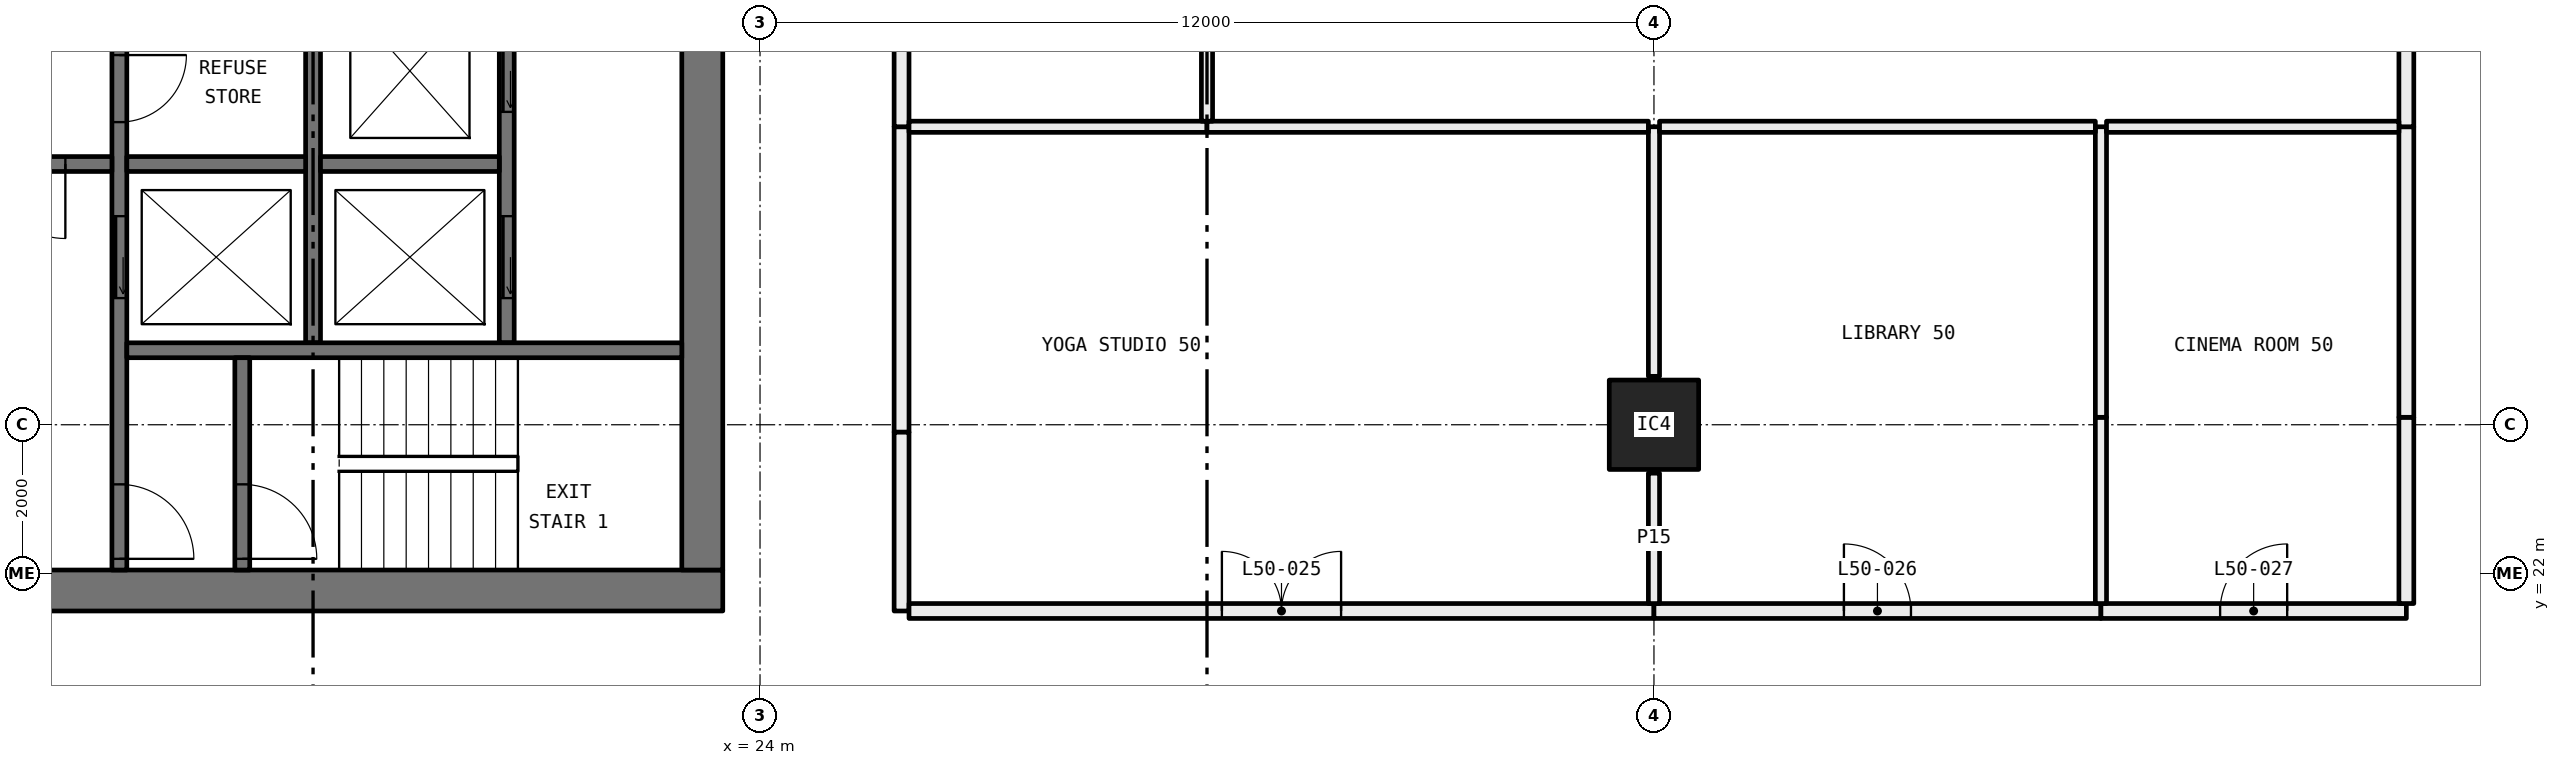
"""IFC4 building model, lengths in metres.
Left out: names, types, materials, properties, quantities, classifications, styles, units other than length and angle.
Written with IfcOpenShell. Run it as: python <this file> out.ifc"""

import sys

from ifc_helpers import new_model, si_unit, direction, frame, frame_2d, origin, origin_2d, place, context, subcontext, project, spatial, rectangle, hollow_rectangle, extrude, element, fill, save


model = new_model("IFC4")
c1 = context("Model", 3, precision=1e-05, world=origin(), true_north=direction((0.0, 1.0)))
c2 = subcontext(c1, "Body", "Model", "MODEL_VIEW")
j1 = project(units=[si_unit("LENGTHUNIT", "METRE"), si_unit("PLANEANGLEUNIT", "RADIAN")], contexts=[c1])
p1 = place(None, origin())
s1 = spatial("IfcSite", under=j1, at=p1, CompositionType="ELEMENT")
p2 = place(p1, origin())
s2 = spatial("IfcBuilding", under=s1, at=p2, CompositionType="ELEMENT")
p3 = place(p2, frame((0.0, 0.0, 189.3)))
s3 = spatial("IfcBuildingStorey", under=s2, at=p3, CompositionType="ELEMENT", Elevation=189.3)
p4 = place(p3, frame((36.0, 24.0, 0.0), z_axis=(0.0, 0.0, 1.0), x_axis=(1.0, 0.0, 0.0)))
e1 = element("IfcColumn", 1, at=p4, inside=s3, PredefinedType="COLUMN", context=c2, shape_type="SweptSolid", body=[
    extrude(hollow_rectangle(XDim=1.2, YDim=1.2, WallThickness=0.05, at=origin_2d()), origin(), (0.0, 0.0, 1.0), 3.05),
])
p5 = place(p3, frame((25.9, 28.0, 0.0), z_axis=(0.0, 0.0, 1.0), x_axis=(0.0, -1.0, 0.0)))
e2 = element("IfcWall", 2, at=p5, inside=s3, PredefinedType="PARTITIONING", context=c2, shape_type="SweptSolid", body=[
    extrude(rectangle(XDim=4.1, YDim=0.2, at=frame_2d((2.05, 0.0))), origin(), (0.0, 0.0, 1.0), 2.45),
])
p6 = place(p3, frame((25.9, 23.9, 0.0), z_axis=(0.0, 0.0, 1.0), x_axis=(0.0, -1.0, 0.0)))
e3 = element("IfcWall", 3, at=p6, inside=s3, PredefinedType="PARTITIONING", context=c2, shape_type="SweptSolid", body=[
    extrude(rectangle(XDim=2.4, YDim=0.2, at=frame_2d((1.2, 0.0))), origin(), (0.0, 0.0, 1.0), 3.05),
])
p7 = place(p3, frame((26.0, 21.5, 0.0), z_axis=(0.0, 0.0, 1.0), x_axis=(1.0, 0.0, 0.0)))
e4 = element("IfcWall", 4, at=p7, inside=s3, PredefinedType="PARTITIONING", context=c2, shape_type="SweptSolid", body=[
    extrude(rectangle(XDim=10.0, YDim=0.2, at=frame_2d((5.0, 0.0))), origin(), (0.0, 0.0, 1.0), 2.45),
])
p8 = place(p7, frame((4.2, 0.0, 0.0)))
e5 = element("IfcOpeningElement", 5, at=p8, cuts=e4, PredefinedType="OPENING", context=c2, shape_type="SweptSolid", body=[
    extrude(rectangle(XDim=1.6, YDim=2.1, at=frame_2d((0.8, 1.05))), frame((0.0, 0.11, 0.0), z_axis=(0.0, -1.0, 0.0), x_axis=(1.0, 0.0, 0.0)), (0.0, 0.0, 1.0), 0.22),
])
p9 = place(p3, frame((36.0, 21.5, 0.0), z_axis=(0.0, 0.0, 1.0), x_axis=(1.0, 0.0, 0.0)))
e6 = element("IfcWall", 6, at=p9, inside=s3, PredefinedType="PARTITIONING", context=c2, shape_type="SweptSolid", body=[
    extrude(rectangle(XDim=6.0, YDim=0.2, at=frame_2d((3.0, 0.0))), origin(), (0.0, 0.0, 1.0), 2.45),
])
p10 = place(p9, frame((2.55, 0.0, 0.0)))
e7 = element("IfcOpeningElement", 7, at=p10, cuts=e6, PredefinedType="OPENING", context=c2, shape_type="SweptSolid", body=[
    extrude(rectangle(XDim=0.9, YDim=2.1, at=frame_2d((0.45, 1.05))), frame((0.0, 0.11, 0.0), z_axis=(0.0, -1.0, 0.0), x_axis=(1.0, 0.0, 0.0)), (0.0, 0.0, 1.0), 0.22),
])
p11 = place(p3, frame((42.0, 21.5, 0.0), z_axis=(0.0, 0.0, 1.0), x_axis=(1.0, 0.0, 0.0)))
e8 = element("IfcWall", 8, at=p11, inside=s3, PredefinedType="PARTITIONING", context=c2, shape_type="SweptSolid", body=[
    extrude(rectangle(XDim=4.1, YDim=0.2, at=frame_2d((2.05, 0.0))), origin(), (0.0, 0.0, 1.0), 3.05),
])
p12 = place(p11, frame((1.6, 0.0, 0.0)))
e9 = element("IfcOpeningElement", 9, at=p12, cuts=e8, PredefinedType="OPENING", context=c2, shape_type="SweptSolid", body=[
    extrude(rectangle(XDim=0.9, YDim=2.1, at=frame_2d((0.45, 1.05))), frame((0.0, 0.11, 0.0), z_axis=(0.0, -1.0, 0.0), x_axis=(1.0, 0.0, 0.0)), (0.0, 0.0, 1.0), 0.22),
])
p13 = place(p3, frame((46.1, 21.6, 0.0), z_axis=(0.0, 0.0, 1.0), x_axis=(0.0, 1.0, 0.0)))
e10 = element("IfcWall", 10, at=p13, inside=s3, PredefinedType="PARTITIONING", context=c2, shape_type="SweptSolid", body=[
    extrude(rectangle(XDim=2.5, YDim=0.2, at=frame_2d((1.25, 0.0))), origin(), (0.0, 0.0, 1.0), 2.45),
])
p14 = place(p3, frame((46.1, 24.1, 0.0), z_axis=(0.0, 0.0, 1.0), x_axis=(0.0, 1.0, 0.0)))
e11 = element("IfcWall", 11, at=p14, inside=s3, PredefinedType="PARTITIONING", context=c2, shape_type="SweptSolid", body=[
    extrude(rectangle(XDim=3.9, YDim=0.2, at=frame_2d((1.95, 0.0))), origin(), (0.0, 0.0, 1.0), 3.05),
])
p15 = place(p3, frame((25.9, 35.9, 0.0), z_axis=(0.0, 0.0, 1.0), x_axis=(0.0, -1.0, 0.0)))
e12 = element("IfcWall", 12, at=p15, inside=s3, PredefinedType="PARTITIONING", context=c2, shape_type="SweptSolid", body=[
    extrude(rectangle(XDim=7.9, YDim=0.2, at=frame_2d((3.95, 0.0))), origin(), (0.0, 0.0, 1.0), 3.05),
])
p16 = place(p15, frame((3.5, 0.0, 0.0)))
e13 = element("IfcOpeningElement", 13, at=p16, cuts=e12, PredefinedType="OPENING", context=c2, shape_type="SweptSolid", body=[
    extrude(rectangle(XDim=0.9, YDim=2.1, at=frame_2d((0.45, 1.05))), frame((0.0, 0.11, 0.0), z_axis=(0.0, -1.0, 0.0), x_axis=(1.0, 0.0, 0.0)), (0.0, 0.0, 1.0), 0.22),
])
p17 = place(p3, frame((46.1, 28.0, 0.0), z_axis=(0.0, 0.0, 1.0), x_axis=(0.0, 1.0, 0.0)))
e14 = element("IfcWall", 14, at=p17, inside=s3, PredefinedType="PARTITIONING", context=c2, shape_type="SweptSolid", body=[
    extrude(rectangle(XDim=8.1, YDim=0.2, at=frame_2d((4.05, 0.0))), origin(), (0.0, 0.0, 1.0), 2.45),
])
p18 = place(p3, frame((36.0, 21.6, 0.0), z_axis=(0.0, 0.0, 1.0), x_axis=(0.0, 1.0, 0.0)))
e15 = element("IfcWall", 15, at=p18, inside=s3, PredefinedType="PARTITIONING", context=c2, shape_type="SweptSolid", body=[
    extrude(rectangle(XDim=1.75, YDim=0.15, at=frame_2d((0.875, 0.0))), origin(), (0.0, 0.0, 1.0), 2.45),
])
p19 = place(p3, frame((36.0, 24.65, 0.0), z_axis=(0.0, 0.0, 1.0), x_axis=(0.0, 1.0, 0.0)))
e16 = element("IfcWall", 16, at=p19, inside=s3, PredefinedType="PARTITIONING", context=c2, shape_type="SweptSolid", body=[
    extrude(rectangle(XDim=3.35, YDim=0.15, at=frame_2d((1.675, 0.0))), origin(), (0.0, 0.0, 1.0), 2.45),
])
p20 = place(p3, frame((30.0, 28.0, 0.0), z_axis=(0.0, 0.0, 1.0), x_axis=(-1.0, 0.0, 0.0)))
e17 = element("IfcWall", 17, at=p20, inside=s3, PredefinedType="PARTITIONING", context=c2, shape_type="SweptSolid", body=[
    extrude(rectangle(XDim=4.0, YDim=0.15, at=frame_2d((2.0, 0.0))), origin(), (0.0, 0.0, 1.0), 3.05),
])
p21 = place(p3, frame((35.925, 28.0, 0.0), z_axis=(0.0, 0.0, 1.0), x_axis=(-1.0, 0.0, 0.0)))
e18 = element("IfcWall", 18, at=p21, inside=s3, PredefinedType="PARTITIONING", context=c2, shape_type="SweptSolid", body=[
    extrude(rectangle(XDim=5.925, YDim=0.15, at=frame_2d((2.962, 0.0))), origin(), (0.0, 0.0, 1.0), 2.45),
])
p22 = place(p3, frame((42.0, 21.6, 0.0), z_axis=(0.0, 0.0, 1.0), x_axis=(0.0, 1.0, 0.0)))
e19 = element("IfcWall", 19, at=p22, inside=s3, PredefinedType="PARTITIONING", context=c2, shape_type="SweptSolid", body=[
    extrude(rectangle(XDim=2.5, YDim=0.15, at=frame_2d((1.25, 0.0))), origin(), (0.0, 0.0, 1.0), 2.45),
])
p23 = place(p3, frame((42.0, 24.1, 0.0), z_axis=(0.0, 0.0, 1.0), x_axis=(0.0, 1.0, 0.0)))
e20 = element("IfcWall", 20, at=p23, inside=s3, PredefinedType="PARTITIONING", context=c2, shape_type="SweptSolid", body=[
    extrude(rectangle(XDim=3.9, YDim=0.15, at=frame_2d((1.95, 0.0))), origin(), (0.0, 0.0, 1.0), 3.05),
])
p24 = place(p3, frame((41.925, 28.0, 0.0), z_axis=(0.0, 0.0, 1.0), x_axis=(-1.0, 0.0, 0.0)))
e21 = element("IfcWall", 21, at=p24, inside=s3, PredefinedType="PARTITIONING", context=c2, shape_type="SweptSolid", body=[
    extrude(rectangle(XDim=5.85, YDim=0.15, at=frame_2d((2.925, 0.0))), origin(), (0.0, 0.0, 1.0), 2.45),
])
p25 = place(p3, frame((46.0, 28.0, 0.0), z_axis=(0.0, 0.0, 1.0), x_axis=(-1.0, 0.0, 0.0)))
e22 = element("IfcWall", 22, at=p25, inside=s3, PredefinedType="PARTITIONING", context=c2, shape_type="SweptSolid", body=[
    extrude(rectangle(XDim=3.925, YDim=0.15, at=frame_2d((1.962, 0.0))), origin(), (0.0, 0.0, 1.0), 3.05),
])
p26 = place(p3, frame((30.0, 28.075, 0.0), z_axis=(0.0, 0.0, 1.0), x_axis=(0.0, 1.0, 0.0)))
e23 = element("IfcWall", 23, at=p26, inside=s3, PredefinedType="PARTITIONING", context=c2, shape_type="SweptSolid", body=[
    extrude(rectangle(XDim=8.025, YDim=0.15, at=frame_2d((4.013, 0.0))), origin(), (0.0, 0.0, 1.0), 2.45),
])
p27 = place(p3, frame((12.5, 21.775, 0.0), z_axis=(0.0, 0.0, 1.0), x_axis=(1.0, 0.0, 0.0)))
e24 = element("IfcWall", 24, at=p27, inside=s3, PredefinedType="SHEAR", context=c2, shape_type="SweptSolid", body=[
    extrude(rectangle(XDim=11.0, YDim=0.55, at=frame_2d((5.5, 0.0))), origin(), (0.0, 0.0, 1.0), 3.05),
])
p28 = place(p3, frame((23.225, 22.05, 0.0), z_axis=(0.0, 0.0, 1.0), x_axis=(0.0, 1.0, 0.0)))
e25 = element("IfcWall", 25, at=p28, inside=s3, PredefinedType="SHEAR", context=c2, shape_type="SweptSolid", body=[
    extrude(rectangle(XDim=15.9, YDim=0.55, at=frame_2d((7.95, 0.0))), origin(), (0.0, 0.0, 1.0), 3.05),
])
p29 = place(p28, frame((7.15, 0.0, 0.0)))
e26 = element("IfcOpeningElement", 26, at=p29, cuts=e25, PredefinedType="OPENING", context=c2, shape_type="SweptSolid", body=[
    extrude(rectangle(XDim=1.6, YDim=2.1, at=frame_2d((0.8, 1.05))), frame((0.0, 0.285, 0.0), z_axis=(0.0, -1.0, 0.0), x_axis=(1.0, 0.0, 0.0)), (0.0, 0.0, 1.0), 0.57),
])
p30 = place(p3, frame((15.4, 22.05, 0.0), z_axis=(0.0, 0.0, 1.0), x_axis=(0.0, 1.0, 0.0)))
e27 = element("IfcWall", 27, at=p30, inside=s3, PredefinedType="SOLIDWALL", context=c2, shape_type="SweptSolid", body=[
    extrude(rectangle(XDim=12.85, YDim=0.2, at=frame_2d((6.425, 0.0))), origin(), (0.0, 0.0, 1.0), 3.05),
])
p31 = place(p30, frame((3.65, 0.0, 0.0)))
e28 = element("IfcOpeningElement", 28, at=p31, cuts=e27, PredefinedType="OPENING", context=c2, shape_type="SweptSolid", body=[
    extrude(rectangle(XDim=1.1, YDim=2.1, at=frame_2d((0.55, 1.05))), frame((0.0, 0.11, 0.0), z_axis=(0.0, -1.0, 0.0), x_axis=(1.0, 0.0, 0.0)), (0.0, 0.0, 1.0), 0.22),
])
p32 = place(p30, frame((0.15, 0.0, 0.0)))
e29 = element("IfcOpeningElement", 29, at=p32, cuts=e27, PredefinedType="OPENING", context=c2, shape_type="SweptSolid", body=[
    extrude(rectangle(XDim=1.0, YDim=2.1, at=frame_2d((0.5, 1.05))), frame((0.0, 0.11, 0.0), z_axis=(0.0, -1.0, 0.0), x_axis=(1.0, 0.0, 0.0)), (0.0, 0.0, 1.0), 0.22),
])
p33 = place(p30, frame((6.012, 0.0, 0.0)))
e30 = element("IfcOpeningElement", 30, at=p33, cuts=e27, PredefinedType="OPENING", context=c2, shape_type="SweptSolid", body=[
    extrude(rectangle(XDim=0.9, YDim=2.1, at=frame_2d((0.45, 1.05))), frame((0.0, 0.11, 0.0), z_axis=(0.0, -1.0, 0.0), x_axis=(1.0, 0.0, 0.0)), (0.0, 0.0, 1.0), 0.22),
])
p34 = place(p30, frame((9.663, 0.0, 0.0)))
e31 = element("IfcOpeningElement", 31, at=p34, cuts=e27, PredefinedType="OPENING", context=c2, shape_type="SweptSolid", body=[
    extrude(rectangle(XDim=0.9, YDim=2.1, at=frame_2d((0.45, 1.05))), frame((0.0, 0.11, 0.0), z_axis=(0.0, -1.0, 0.0), x_axis=(1.0, 0.0, 0.0)), (0.0, 0.0, 1.0), 0.22),
])
p35 = place(p3, frame((20.6, 25.1, 0.0), z_axis=(0.0, 0.0, 1.0), x_axis=(0.0, 1.0, 0.0)))
e32 = element("IfcWall", 32, at=p35, inside=s3, PredefinedType="SOLIDWALL", context=c2, shape_type="SweptSolid", body=[
    extrude(rectangle(XDim=12.85, YDim=0.2, at=frame_2d((6.425, 0.0))), origin(), (0.0, 0.0, 1.0), 3.05),
])
p36 = place(p35, frame((0.6, 0.0, 0.0)))
e33 = element("IfcOpeningElement", 33, at=p36, cuts=e32, PredefinedType="OPENING", context=c2, shape_type="SweptSolid", body=[
    extrude(rectangle(XDim=1.1, YDim=2.1, at=frame_2d((0.55, 1.05))), frame((0.0, 0.11, 0.0), z_axis=(0.0, -1.0, 0.0), x_axis=(1.0, 0.0, 0.0)), (0.0, 0.0, 1.0), 0.22),
])
p37 = place(p35, frame((3.1, 0.0, 0.0)))
e34 = element("IfcOpeningElement", 34, at=p37, cuts=e32, PredefinedType="OPENING", context=c2, shape_type="SweptSolid", body=[
    extrude(rectangle(XDim=1.1, YDim=2.1, at=frame_2d((0.55, 1.05))), frame((0.0, 0.11, 0.0), z_axis=(0.0, -1.0, 0.0), x_axis=(1.0, 0.0, 0.0)), (0.0, 0.0, 1.0), 0.22),
])
p38 = place(p35, frame((5.6, 0.0, 0.0)))
e35 = element("IfcOpeningElement", 35, at=p38, cuts=e32, PredefinedType="OPENING", context=c2, shape_type="SweptSolid", body=[
    extrude(rectangle(XDim=1.1, YDim=2.1, at=frame_2d((0.55, 1.05))), frame((0.0, 0.11, 0.0), z_axis=(0.0, -1.0, 0.0), x_axis=(1.0, 0.0, 0.0)), (0.0, 0.0, 1.0), 0.22),
])
p39 = place(p35, frame((8.1, 0.0, 0.0)))
e36 = element("IfcOpeningElement", 36, at=p39, cuts=e32, PredefinedType="OPENING", context=c2, shape_type="SweptSolid", body=[
    extrude(rectangle(XDim=1.1, YDim=2.1, at=frame_2d((0.55, 1.05))), frame((0.0, 0.11, 0.0), z_axis=(0.0, -1.0, 0.0), x_axis=(1.0, 0.0, 0.0)), (0.0, 0.0, 1.0), 0.22),
])
p40 = place(p35, frame((10.925, 0.0, 0.0)))
e37 = element("IfcOpeningElement", 37, at=p40, cuts=e32, PredefinedType="OPENING", context=c2, shape_type="SweptSolid", body=[
    extrude(rectangle(XDim=1.0, YDim=2.1, at=frame_2d((0.5, 1.05))), frame((0.0, 0.11, 0.0), z_axis=(0.0, -1.0, 0.0), x_axis=(1.0, 0.0, 0.0)), (0.0, 0.0, 1.0), 0.22),
])
p41 = place(p3, frame((18.0, 25.1, 0.0), z_axis=(0.0, 0.0, 1.0), x_axis=(0.0, 1.0, 0.0)))
e38 = element("IfcWall", 38, at=p41, inside=s3, PredefinedType="SOLIDWALL", context=c2, shape_type="SweptSolid", body=[
    extrude(rectangle(XDim=9.8, YDim=0.2, at=frame_2d((4.9, 0.0))), origin(), (0.0, 0.0, 1.0), 3.05),
])
p42 = place(p3, frame((15.5, 25.0, 0.0), z_axis=(0.0, 0.0, 1.0), x_axis=(1.0, 0.0, 0.0)))
e39 = element("IfcWall", 39, at=p42, inside=s3, PredefinedType="SOLIDWALL", context=c2, shape_type="SweptSolid", body=[
    extrude(rectangle(XDim=7.45, YDim=0.2, at=frame_2d((3.725, 0.0))), origin(), (0.0, 0.0, 1.0), 3.05),
])
p43 = place(p3, frame((13.05, 27.5, 0.0), z_axis=(0.0, 0.0, 1.0), x_axis=(1.0, 0.0, 0.0)))
e40 = element("IfcWall", 40, at=p43, inside=s3, PredefinedType="SOLIDWALL", context=c2, shape_type="SweptSolid", body=[
    extrude(rectangle(XDim=2.25, YDim=0.2, at=frame_2d((1.125, 0.0))), origin(), (0.0, 0.0, 1.0), 3.05),
])
p44 = place(p43, frame((0.625, 0.0, 0.0)))
e41 = element("IfcOpeningElement", 41, at=p44, cuts=e40, PredefinedType="OPENING", context=c2, shape_type="SweptSolid", body=[
    extrude(rectangle(XDim=1.0, YDim=2.1, at=frame_2d((0.5, 1.05))), frame((0.0, 0.11, 0.0), z_axis=(0.0, -1.0, 0.0), x_axis=(1.0, 0.0, 0.0)), (0.0, 0.0, 1.0), 0.22),
])
p45 = place(p3, frame((17.05, 22.05, 0.0), z_axis=(0.0, 0.0, 1.0), x_axis=(0.0, 1.0, 0.0)))
e42 = element("IfcWall", 42, at=p45, inside=s3, PredefinedType="SOLIDWALL", context=c2, shape_type="SweptSolid", body=[
    extrude(rectangle(XDim=2.85, YDim=0.2, at=frame_2d((1.425, 0.0))), origin(), (0.0, 0.0, 1.0), 3.05),
])
p46 = place(p45, frame((0.15, 0.0, 0.0)))
e43 = element("IfcOpeningElement", 43, at=p46, cuts=e42, PredefinedType="OPENING", context=c2, shape_type="SweptSolid", body=[
    extrude(rectangle(XDim=1.0, YDim=2.1, at=frame_2d((0.5, 1.05))), frame((0.0, 0.11, 0.0), z_axis=(0.0, -1.0, 0.0), x_axis=(1.0, 0.0, 0.0)), (0.0, 0.0, 1.0), 0.22),
])
for number, where, z_axis, x_axis in (
    (44, (15.5, 27.5, 0.0), (0.0, 0.0, 1.0), (1.0, 0.0, 0.0)),
    (45, (18.1, 27.5, 0.0), (0.0, 0.0, 1.0), (1.0, 0.0, 0.0)),
):
    element("IfcWall", number, at=place(p3, frame(where, z_axis=z_axis, x_axis=x_axis)), inside=s3, PredefinedType="SOLIDWALL", context=c2, shape_type="SweptSolid", body=[
        extrude(rectangle(XDim=2.4, YDim=0.2, at=frame_2d((1.2, 0.0))), origin(), (0.0, 0.0, 1.0), 3.05),
    ])
p47 = place(p8, origin())
e46 = element("IfcDoor", 46, at=p47, inside=s3, OperationType="DOUBLE_DOOR_SINGLE_SWING", PredefinedType="DOOR", context=c2, shape_type="SweptSolid", body=[
    extrude(rectangle(XDim=1.6, YDim=2.1, at=frame_2d((0.8, 1.05))), frame((0.0, 0.025, 0.0), z_axis=(0.0, -1.0, 0.0), x_axis=(1.0, 0.0, 0.0)), (0.0, 0.0, 1.0), 0.05),
])
fill(e5, e46)
p48 = place(p10, origin())
e47 = element("IfcDoor", 47, at=p48, inside=s3, OperationType="SINGLE_SWING_RIGHT", PredefinedType="DOOR", context=c2, shape_type="SweptSolid", body=[
    extrude(rectangle(XDim=0.9, YDim=2.1, at=frame_2d((0.45, 1.05))), frame((0.0, 0.025, 0.0), z_axis=(0.0, -1.0, 0.0), x_axis=(1.0, 0.0, 0.0)), (0.0, 0.0, 1.0), 0.05),
])
fill(e7, e47)
p49 = place(p12, origin())
e48 = element("IfcDoor", 48, at=p49, inside=s3, OperationType="SINGLE_SWING_LEFT", PredefinedType="DOOR", context=c2, shape_type="SweptSolid", body=[
    extrude(rectangle(XDim=0.9, YDim=2.1, at=frame_2d((0.45, 1.05))), frame((0.0, 0.025, 0.0), z_axis=(0.0, -1.0, 0.0), x_axis=(1.0, 0.0, 0.0)), (0.0, 0.0, 1.0), 0.05),
])
fill(e9, e48)
p50 = place(p36, origin())
e49 = element("IfcDoor", 49, at=p50, inside=s3, OperationType="SLIDING_TO_LEFT", PredefinedType="DOOR", context=c2, shape_type="SweptSolid", body=[
    extrude(rectangle(XDim=1.1, YDim=2.1, at=frame_2d((0.55, 1.05))), frame((0.0, 0.025, 0.0), z_axis=(0.0, -1.0, 0.0), x_axis=(1.0, 0.0, 0.0)), (0.0, 0.0, 1.0), 0.05),
])
fill(e33, e49)
p51 = place(p37, origin())
e50 = element("IfcDoor", 50, at=p51, inside=s3, OperationType="SLIDING_TO_LEFT", PredefinedType="DOOR", context=c2, shape_type="SweptSolid", body=[
    extrude(rectangle(XDim=1.1, YDim=2.1, at=frame_2d((0.55, 1.05))), frame((0.0, 0.025, 0.0), z_axis=(0.0, -1.0, 0.0), x_axis=(1.0, 0.0, 0.0)), (0.0, 0.0, 1.0), 0.05),
])
fill(e34, e50)
p52 = place(p31, origin())
e51 = element("IfcDoor", 51, at=p52, inside=s3, OperationType="SLIDING_TO_LEFT", PredefinedType="DOOR", context=c2, shape_type="SweptSolid", body=[
    extrude(rectangle(XDim=1.1, YDim=2.1, at=frame_2d((0.55, 1.05))), frame((0.0, 0.025, 0.0), z_axis=(0.0, -1.0, 0.0), x_axis=(1.0, 0.0, 0.0)), (0.0, 0.0, 1.0), 0.05),
])
fill(e28, e51)
p53 = place(p46, frame((1.0, 0.0, 0.0), x_axis=(-1.0, 0.0, 0.0)))
e52 = element("IfcDoor", 52, at=p53, inside=s3, OperationType="SINGLE_SWING_LEFT", PredefinedType="DOOR", context=c2, shape_type="SweptSolid", body=[
    extrude(rectangle(XDim=1.0, YDim=2.1, at=frame_2d((0.5, 1.05))), frame((0.0, 0.025, 0.0), z_axis=(0.0, -1.0, 0.0), x_axis=(1.0, 0.0, 0.0)), (0.0, 0.0, 1.0), 0.05),
])
fill(e43, e52)
p54 = place(p32, frame((1.0, 0.0, 0.0), x_axis=(-1.0, 0.0, 0.0)))
e53 = element("IfcDoor", 53, at=p54, inside=s3, OperationType="SINGLE_SWING_LEFT", PredefinedType="DOOR", context=c2, shape_type="SweptSolid", body=[
    extrude(rectangle(XDim=1.0, YDim=2.1, at=frame_2d((0.5, 1.05))), frame((0.0, 0.025, 0.0), z_axis=(0.0, -1.0, 0.0), x_axis=(1.0, 0.0, 0.0)), (0.0, 0.0, 1.0), 0.05),
])
fill(e29, e53)
p55 = place(p44, frame((1.0, 0.0, 0.0), x_axis=(-1.0, 0.0, 0.0)))
e54 = element("IfcDoor", 54, at=p55, inside=s3, OperationType="SINGLE_SWING_RIGHT", PredefinedType="DOOR", context=c2, shape_type="SweptSolid", body=[
    extrude(rectangle(XDim=1.0, YDim=2.1, at=frame_2d((0.5, 1.05))), frame((0.0, 0.025, 0.0), z_axis=(0.0, -1.0, 0.0), x_axis=(1.0, 0.0, 0.0)), (0.0, 0.0, 1.0), 0.05),
])
fill(e41, e54)
p56 = place(p33, frame((0.9, 0.0, 0.0), x_axis=(-1.0, 0.0, 0.0)))
e55 = element("IfcDoor", 55, at=p56, inside=s3, OperationType="SINGLE_SWING_RIGHT", PredefinedType="DOOR", context=c2, shape_type="SweptSolid", body=[
    extrude(rectangle(XDim=0.9, YDim=2.1, at=frame_2d((0.45, 1.05))), frame((0.0, 0.025, 0.0), z_axis=(0.0, -1.0, 0.0), x_axis=(1.0, 0.0, 0.0)), (0.0, 0.0, 1.0), 0.05),
])
fill(e30, e55)
save(model, sys.argv[1])
